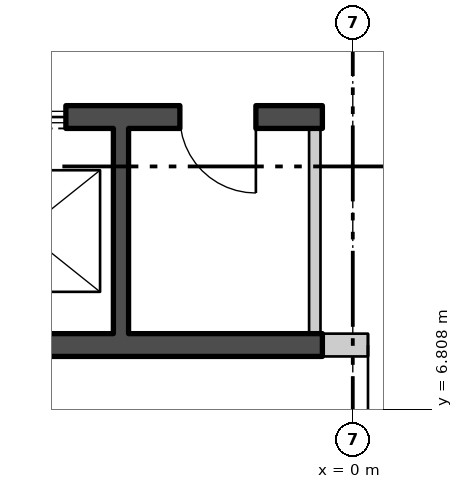
"""IFC4 building model, lengths in metres.
Left out: names, types, materials, properties, quantities, classifications, styles, units other than length and angle.
Written with IfcOpenShell. Run it as: python <this file> out.ifc"""

import sys

from ifc_helpers import new_model, si_unit, direction, frame, frame_2d, origin, place, context, subcontext, project, spatial, polyline, rectangle, outline, extrude, element, fill, save


model = new_model("IFC4")
c1 = context("Model", 3, precision=1e-05, world=origin(), true_north=direction((0.0, 1.0)))
c2 = subcontext(c1, "Body", "Model", "MODEL_VIEW")
j1 = project(units=[si_unit("LENGTHUNIT", "METRE"), si_unit("PLANEANGLEUNIT", "RADIAN")], contexts=[c1])
p1 = place(None, origin())
s1 = spatial("IfcSite", under=j1, at=p1, CompositionType="ELEMENT")
p2 = place(p1, origin())
s2 = spatial("IfcBuilding", under=s1, at=p2, CompositionType="ELEMENT")
p3 = place(p2, frame((0.0, 0.0, 321.0)))
s3 = spatial("IfcBuildingStorey", under=s2, at=p3, CompositionType="ELEMENT", Elevation=321.0)
p4 = place(p3, frame((-24.875, 16.493, -0.18), z_axis=(0.0, 0.0, 1.0), x_axis=(0.500000141277, -0.866025322218, 0.0)))
e1 = element("IfcWall", 1, at=p4, inside=s3, PredefinedType="SOLIDWALL", context=c2, shape_type="SweptSolid", body=[
    extrude(outline(polyline([(-0.13, -0.225), (45.86, -0.225), (45.6, 0.225), (0.13, 0.225), (-0.13, -0.225)])), origin(), (0.0, 0.0, 1.0), 3.98),
])
p5 = place(p4, frame((1.424, 0.0, 1.08)))
e2 = element("IfcOpeningElement", 2, at=p5, cuts=e1, PredefinedType="OPENING", context=c2, shape_type="SweptSolid", body=[
    extrude(rectangle(XDim=2.4, YDim=2.3, at=frame_2d((1.2, 1.15))), frame((0.0, 0.235, 0.0), z_axis=(0.0, -1.0, 0.0), x_axis=(1.0, 0.0, 0.0)), (0.0, 0.0, 1.0), 0.47),
])
p6 = place(p4, frame((5.892, 0.0, 1.08)))
e3 = element("IfcOpeningElement", 3, at=p6, cuts=e1, PredefinedType="OPENING", context=c2, shape_type="SweptSolid", body=[
    extrude(rectangle(XDim=2.4, YDim=2.3, at=frame_2d((1.2, 1.15))), frame((0.0, 0.235, 0.0), z_axis=(0.0, -1.0, 0.0), x_axis=(1.0, 0.0, 0.0)), (0.0, 0.0, 1.0), 0.47),
])
p7 = place(p4, frame((10.399, 0.0, 1.08)))
e4 = element("IfcOpeningElement", 4, at=p7, cuts=e1, PredefinedType="OPENING", context=c2, shape_type="SweptSolid", body=[
    extrude(rectangle(XDim=2.4, YDim=2.3, at=frame_2d((1.2, 1.15))), frame((0.0, 0.235, 0.0), z_axis=(0.0, -1.0, 0.0), x_axis=(1.0, 0.0, 0.0)), (0.0, 0.0, 1.0), 0.47),
])
p8 = place(p4, frame((14.905, 0.0, 1.08)))
e5 = element("IfcOpeningElement", 5, at=p8, cuts=e1, PredefinedType="OPENING", context=c2, shape_type="SweptSolid", body=[
    extrude(rectangle(XDim=2.4, YDim=2.3, at=frame_2d((1.2, 1.15))), frame((0.0, 0.235, 0.0), z_axis=(0.0, -1.0, 0.0), x_axis=(1.0, 0.0, 0.0)), (0.0, 0.0, 1.0), 0.47),
])
p9 = place(p4, frame((19.412, 0.0, 1.08)))
e6 = element("IfcOpeningElement", 6, at=p9, cuts=e1, PredefinedType="OPENING", context=c2, shape_type="SweptSolid", body=[
    extrude(rectangle(XDim=2.4, YDim=2.3, at=frame_2d((1.2, 1.15))), frame((0.0, 0.235, 0.0), z_axis=(0.0, -1.0, 0.0), x_axis=(1.0, 0.0, 0.0)), (0.0, 0.0, 1.0), 0.47),
])
p10 = place(p4, frame((23.918, 0.0, 1.08)))
e7 = element("IfcOpeningElement", 7, at=p10, cuts=e1, PredefinedType="OPENING", context=c2, shape_type="SweptSolid", body=[
    extrude(rectangle(XDim=2.4, YDim=2.3, at=frame_2d((1.2, 1.15))), frame((0.0, 0.235, 0.0), z_axis=(0.0, -1.0, 0.0), x_axis=(1.0, 0.0, 0.0)), (0.0, 0.0, 1.0), 0.47),
])
p11 = place(p4, frame((28.425, 0.0, 1.08)))
e8 = element("IfcOpeningElement", 8, at=p11, cuts=e1, PredefinedType="OPENING", context=c2, shape_type="SweptSolid", body=[
    extrude(rectangle(XDim=2.4, YDim=2.3, at=frame_2d((1.2, 1.15))), frame((0.0, 0.235, 0.0), z_axis=(0.0, -1.0, 0.0), x_axis=(1.0, 0.0, 0.0)), (0.0, 0.0, 1.0), 0.47),
])
p12 = place(p4, frame((37.438, 0.0, 1.08)))
e9 = element("IfcOpeningElement", 9, at=p12, cuts=e1, PredefinedType="OPENING", context=c2, shape_type="SweptSolid", body=[
    extrude(rectangle(XDim=2.4, YDim=2.3, at=frame_2d((1.2, 1.15))), frame((0.0, 0.235, 0.0), z_axis=(0.0, -1.0, 0.0), x_axis=(1.0, 0.0, 0.0)), (0.0, 0.0, 1.0), 0.47),
])
p13 = place(p4, frame((41.907, 0.0, 1.08)))
e10 = element("IfcOpeningElement", 10, at=p13, cuts=e1, PredefinedType="OPENING", context=c2, shape_type="SweptSolid", body=[
    extrude(rectangle(XDim=2.4, YDim=2.3, at=frame_2d((1.2, 1.15))), frame((0.0, 0.235, 0.0), z_axis=(0.0, -1.0, 0.0), x_axis=(1.0, 0.0, 0.0)), (0.0, 0.0, 1.0), 0.47),
])
p14 = place(p3, frame((-10.7, 10.65, 0.0), z_axis=(0.0, 0.0, 1.0), x_axis=(1.0, 0.0, 0.0)))
e11 = element("IfcWall", 11, at=p14, inside=s3, PredefinedType="SHEAR", context=c2, shape_type="SweptSolid", body=[
    extrude(rectangle(XDim=10.3, YDim=0.3, at=frame_2d((5.15, 0.0))), origin(), (0.0, 0.0, 1.0), 4.0),
])
p15 = place(p14, frame((0.675, 0.0, 0.0)))
e12 = element("IfcOpeningElement", 12, at=p15, cuts=e11, PredefinedType="OPENING", context=c2, shape_type="SweptSolid", body=[
    extrude(rectangle(XDim=1.1, YDim=2.1, at=frame_2d((0.55, 1.05))), frame((0.0, 0.16, 0.0), z_axis=(0.0, -1.0, 0.0), x_axis=(1.0, 0.0, 0.0)), (0.0, 0.0, 1.0), 0.32),
])
p16 = place(p14, frame((3.275, 0.0, 0.0)))
e13 = element("IfcOpeningElement", 13, at=p16, cuts=e11, PredefinedType="OPENING", context=c2, shape_type="SweptSolid", body=[
    extrude(rectangle(XDim=1.1, YDim=2.1, at=frame_2d((0.55, 1.05))), frame((0.0, 0.16, 0.0), z_axis=(0.0, -1.0, 0.0), x_axis=(1.0, 0.0, 0.0)), (0.0, 0.0, 1.0), 0.32),
])
p17 = place(p14, frame((5.825, 0.0, 0.0)))
e14 = element("IfcOpeningElement", 14, at=p17, cuts=e11, PredefinedType="OPENING", context=c2, shape_type="SweptSolid", body=[
    extrude(rectangle(XDim=1.1, YDim=2.1, at=frame_2d((0.55, 1.05))), frame((0.0, 0.16, 0.0), z_axis=(0.0, -1.0, 0.0), x_axis=(1.0, 0.0, 0.0)), (0.0, 0.0, 1.0), 0.32),
])
p18 = place(p14, frame((8.425, 0.0, 0.0)))
e15 = element("IfcOpeningElement", 15, at=p18, cuts=e11, PredefinedType="OPENING", context=c2, shape_type="SweptSolid", body=[
    extrude(rectangle(XDim=1.0, YDim=2.1, at=frame_2d((0.5, 1.05))), frame((0.0, 0.16, 0.0), z_axis=(0.0, -1.0, 0.0), x_axis=(1.0, 0.0, 0.0)), (0.0, 0.0, 1.0), 0.32),
])
p19 = place(p3, frame((-10.7, 7.65, 0.0), z_axis=(0.0, 0.0, 1.0), x_axis=(1.0, 0.0, 0.0)))
e16 = element("IfcWall", 16, at=p19, inside=s3, PredefinedType="SHEAR", context=c2, shape_type="SweptSolid", body=[
    extrude(rectangle(XDim=10.3, YDim=0.3, at=frame_2d((5.15, 0.0))), origin(), (0.0, 0.0, 1.0), 4.0),
])
p20 = place(p3, frame((-3.05, 7.8, 0.0), z_axis=(0.0, 0.0, 1.0), x_axis=(0.0, 1.0, 0.0)))
e17 = element("IfcWall", 17, at=p20, inside=s3, PredefinedType="SHEAR", context=c2, shape_type="SweptSolid", body=[
    extrude(rectangle(XDim=2.7, YDim=0.2, at=frame_2d((1.35, 0.0))), origin(), (0.0, 0.0, 1.0), 4.0),
])
p21 = place(p3, frame((-0.5, 7.8, 0.0), z_axis=(0.0, 0.0, 1.0), x_axis=(0.0, 1.0, 0.0)))
e18 = element("IfcWall", 18, at=p21, inside=s3, PredefinedType="PARTITIONING", context=c2, shape_type="SweptSolid", body=[
    extrude(rectangle(XDim=2.7, YDim=0.15, at=frame_2d((1.35, 0.0))), origin(), (0.0, 0.0, 1.0), 4.0),
])
p22 = place(p3, frame((-0.4, 7.65, 0.0), z_axis=(0.0, 0.0, 1.0), x_axis=(1.0, 0.0, 0.0)))
e19 = element("IfcWall", 19, at=p22, inside=s3, PredefinedType="PARTITIONING", context=c2, shape_type="SweptSolid", body=[
    extrude(rectangle(XDim=3.0, YDim=0.3, at=frame_2d((1.5, 0.0))), origin(), (0.0, 0.0, 1.0), 4.0),
])
p23 = place(p22, frame((0.6, 0.0, 0.0)))
e20 = element("IfcOpeningElement", 20, at=p23, cuts=e19, PredefinedType="OPENING", context=c2, shape_type="SweptSolid", body=[
    extrude(rectangle(XDim=1.8, YDim=2.4, at=frame_2d((0.9, 1.2))), frame((0.0, 0.16, 0.0), z_axis=(0.0, -1.0, 0.0), x_axis=(1.0, 0.0, 0.0)), (0.0, 0.0, 1.0), 0.32),
])
p24 = place(p17, origin())
e21 = element("IfcDoor", 21, at=p24, inside=s3, OperationType="SLIDING_TO_LEFT", PredefinedType="DOOR", context=c2, shape_type="SweptSolid", body=[
    extrude(rectangle(XDim=1.1, YDim=2.1, at=frame_2d((0.55, 1.05))), frame((0.0, 0.025, 0.0), z_axis=(0.0, -1.0, 0.0), x_axis=(1.0, 0.0, 0.0)), (0.0, 0.0, 1.0), 0.05),
])
fill(e14, e21)
p25 = place(p18, origin())
e22 = element("IfcDoor", 22, at=p25, inside=s3, OperationType="SINGLE_SWING_RIGHT", PredefinedType="DOOR", context=c2, shape_type="SweptSolid", body=[
    extrude(rectangle(XDim=1.0, YDim=2.1, at=frame_2d((0.5, 1.05))), frame((0.0, 0.025, 0.0), z_axis=(0.0, -1.0, 0.0), x_axis=(1.0, 0.0, 0.0)), (0.0, 0.0, 1.0), 0.05),
])
fill(e15, e22)
p26 = place(p23, origin())
e23 = element("IfcDoor", 23, at=p26, inside=s3, OperationType="DOUBLE_DOOR_SINGLE_SWING", PredefinedType="DOOR", context=c2, shape_type="SweptSolid", body=[
    extrude(rectangle(XDim=1.8, YDim=2.4, at=frame_2d((0.9, 1.2))), frame((0.0, 0.025, 0.0), z_axis=(0.0, -1.0, 0.0), x_axis=(1.0, 0.0, 0.0)), (0.0, 0.0, 1.0), 0.05),
])
fill(e20, e23)
save(model, sys.argv[1])
